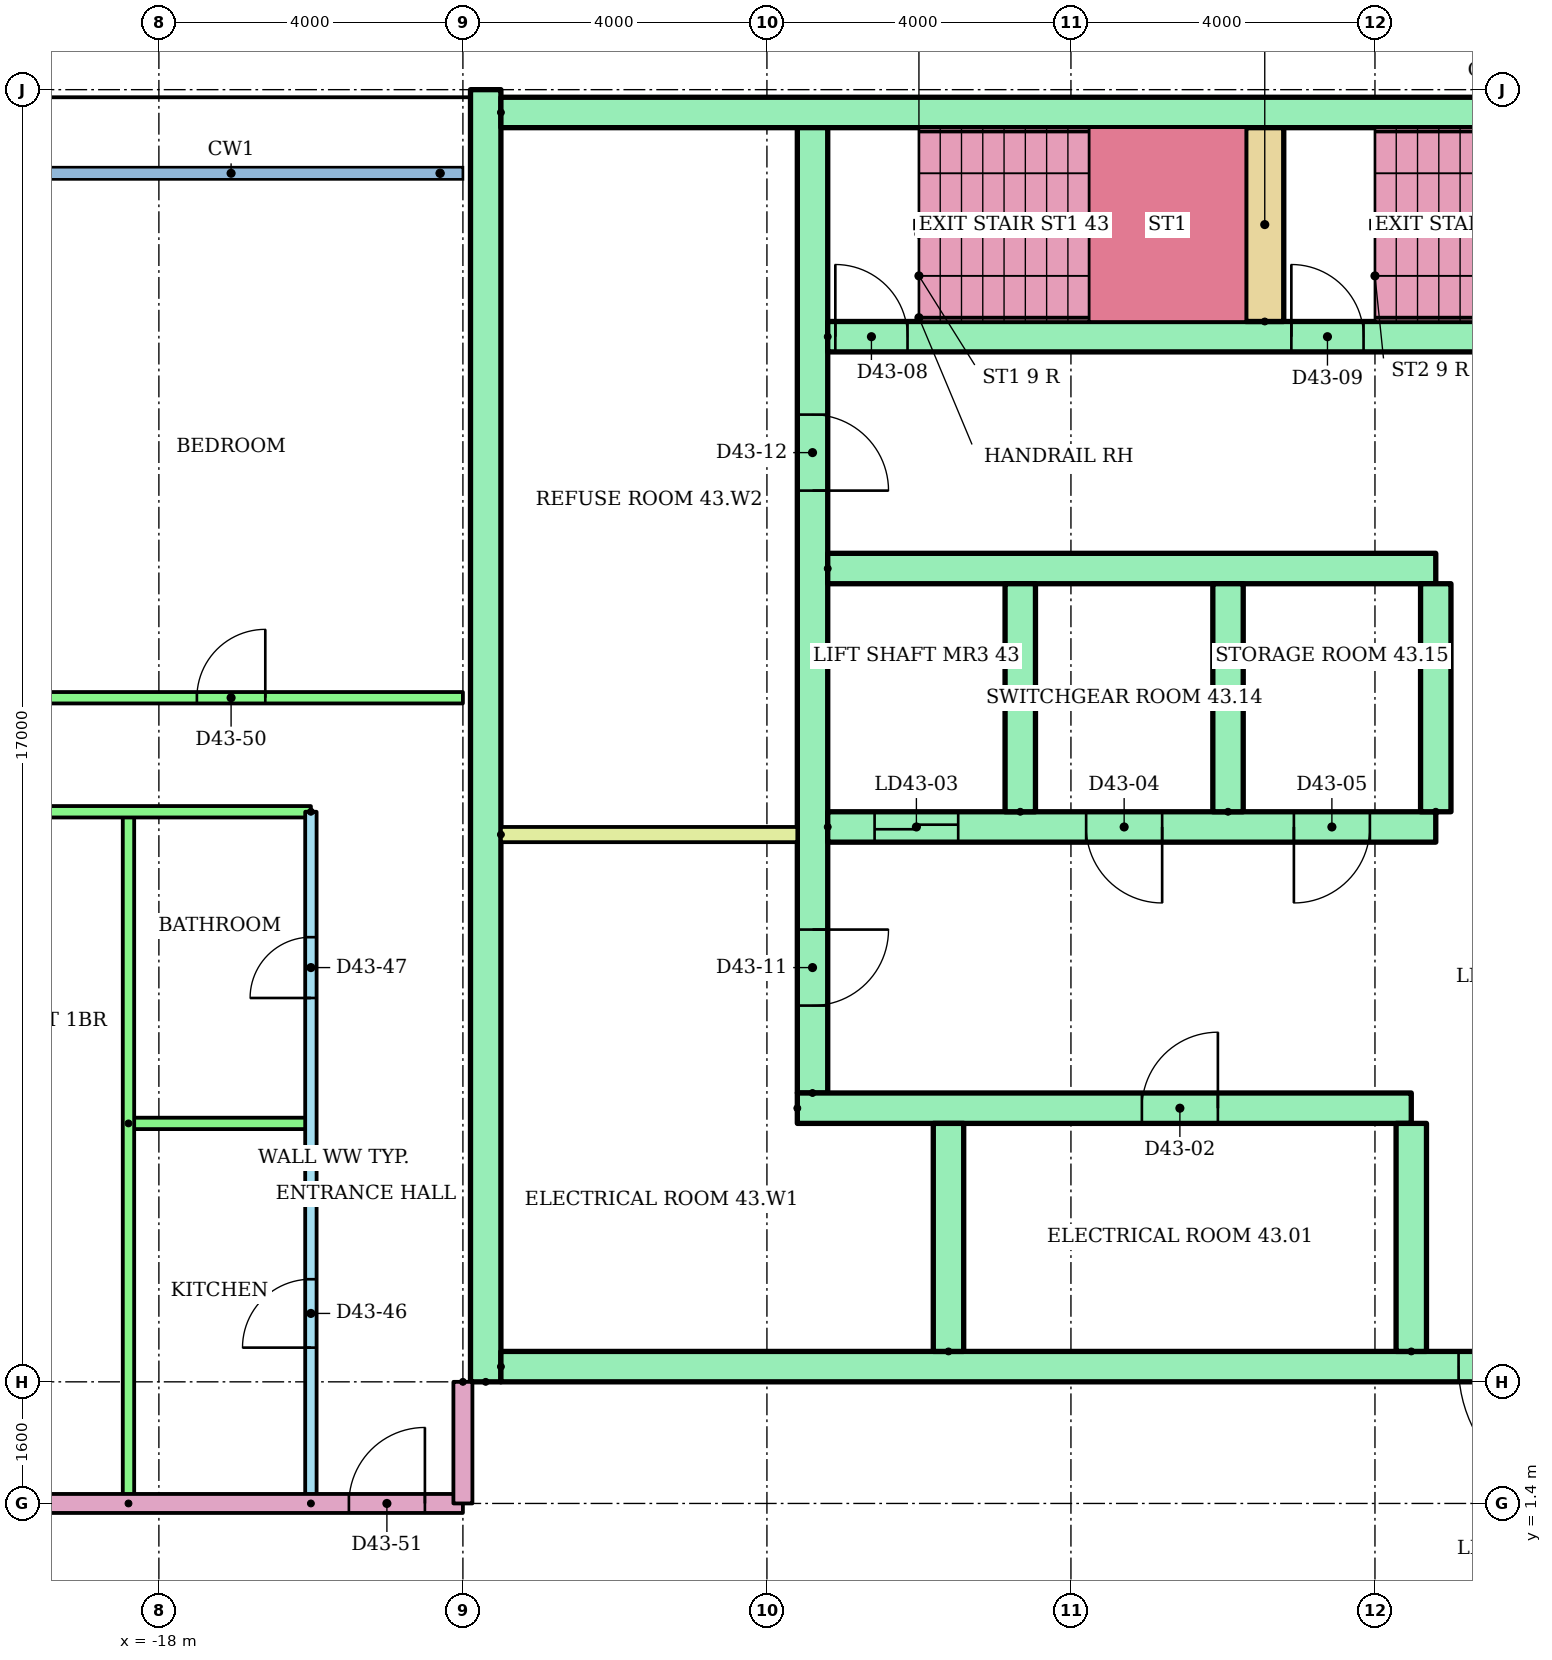
"""IFC4 building model, lengths in metres.
Left out: names, types, materials, properties, quantities, classifications, styles, units other than length and angle.
Written with IfcOpenShell. Run it as: python <this file> out.ifc"""

import sys

from ifc_helpers import new_model, si_unit, direction, frame, frame_2d, origin, place, context, subcontext, project, spatial, rectangle, extrude, element, fill, save


model = new_model("IFC4")
c1 = context("Model", 3, precision=1e-05, world=origin(), true_north=direction((0.0, 1.0)))
c2 = subcontext(c1, "Body", "Model", "MODEL_VIEW")
j1 = project(units=[si_unit("LENGTHUNIT", "METRE"), si_unit("PLANEANGLEUNIT", "RADIAN")], contexts=[c1])
p1 = place(None, origin())
s1 = spatial("IfcSite", under=j1, at=p1, CompositionType="ELEMENT")
p2 = place(p1, origin())
s2 = spatial("IfcBuilding", under=s1, at=p2, CompositionType="ELEMENT")
p3 = place(p2, frame((0.0, 0.0, 168.5)))
s3 = spatial("IfcBuildingStorey", under=s2, at=p3, CompositionType="ELEMENT", Elevation=168.5)
p4 = place(p3, frame((-13.7, 3.0, 0.0), z_axis=(0.0, 0.0, 1.0), x_axis=(0.0, 1.0, 0.0)))
e1 = element("IfcWall", 1, at=p4, inside=s3, PredefinedType="SHEAR", context=c2, shape_type="SweptSolid", body=[
    extrude(rectangle(XDim=17.0, YDim=0.4, at=frame_2d((8.5, 0.0))), origin(), (0.0, 0.0, 1.0), 2.92),
])
p5 = place(p3, frame((-13.5, 19.7, 0.0)))
e2 = element("IfcWall", 2, at=p5, inside=s3, PredefinedType="SHEAR", context=c2, shape_type="SweptSolid", body=[
    extrude(rectangle(XDim=27.0, YDim=0.4, at=frame_2d((13.5, 0.0))), origin(), (0.0, 0.0, 1.0), 2.92),
])
p6 = place(p3, frame((-9.4, 6.8, 0.0), z_axis=(0.0, 0.0, 1.0), x_axis=(0.0, 1.0, 0.0)))
e3 = element("IfcWall", 3, at=p6, inside=s3, PredefinedType="SHEAR", context=c2, shape_type="SweptSolid", body=[
    extrude(rectangle(XDim=12.7, YDim=0.4, at=frame_2d((6.35, 0.0))), origin(), (0.0, 0.0, 1.0), 2.92),
])
p7 = place(p6, frame((1.15, 0.0, 0.0)))
e4 = element("IfcOpeningElement", 4, at=p7, cuts=e3, PredefinedType="OPENING", context=c2, shape_type="SweptSolid", body=[
    extrude(rectangle(XDim=1.0, YDim=2.1, at=frame_2d((0.5, 1.05))), frame((0.0, 0.21, 0.0), z_axis=(0.0, -1.0, 0.0), x_axis=(1.0, 0.0, 0.0)), (0.0, 0.0, 1.0), 0.42),
])
p8 = place(p6, frame((7.925, 0.0, 0.0)))
e5 = element("IfcOpeningElement", 5, at=p8, cuts=e3, PredefinedType="OPENING", context=c2, shape_type="SweptSolid", body=[
    extrude(rectangle(XDim=1.0, YDim=2.1, at=frame_2d((0.5, 1.05))), frame((0.0, 0.21, 0.0), z_axis=(0.0, -1.0, 0.0), x_axis=(1.0, 0.0, 0.0)), (0.0, 0.0, 1.0), 0.42),
])
p9 = place(p3, frame((-13.5, 3.2, 0.0)))
e6 = element("IfcWall", 6, at=p9, inside=s3, PredefinedType="SHEAR", context=c2, shape_type="SweptSolid", body=[
    extrude(rectangle(XDim=27.0, YDim=0.4, at=frame_2d((13.5, 0.0))), origin(), (0.0, 0.0, 1.0), 2.92),
])
p10 = place(p9, frame((22.083, 0.0, 0.0)))
e7 = element("IfcOpeningElement", 7, at=p10, cuts=e6, PredefinedType="OPENING", context=c2, shape_type="SweptSolid", body=[
    extrude(rectangle(XDim=1.1, YDim=2.1, at=frame_2d((0.55, 1.05))), frame((0.0, 0.21, 0.0), z_axis=(0.0, -1.0, 0.0), x_axis=(1.0, 0.0, 0.0)), (0.0, 0.0, 1.0), 0.42),
])
p11 = place(p9, frame((25.128, 0.0, 0.0)))
e8 = element("IfcOpeningElement", 8, at=p11, cuts=e6, PredefinedType="OPENING", context=c2, shape_type="SweptSolid", body=[
    extrude(rectangle(XDim=1.1, YDim=2.1, at=frame_2d((0.55, 1.05))), frame((0.0, 0.21, 0.0), z_axis=(0.0, -1.0, 0.0), x_axis=(1.0, 0.0, 0.0)), (0.0, 0.0, 1.0), 0.42),
])
p12 = place(p9, frame((12.6, 0.0, 0.0)))
e9 = element("IfcOpeningElement", 9, at=p12, cuts=e6, PredefinedType="OPENING", context=c2, shape_type="SweptSolid", body=[
    extrude(rectangle(XDim=1.8, YDim=2.1, at=frame_2d((0.9, 1.05))), frame((0.0, 0.21, 0.0), z_axis=(0.0, -1.0, 0.0), x_axis=(1.0, 0.0, 0.0)), (0.0, 0.0, 1.0), 0.42),
])
p13 = place(p3, frame((-9.6, 6.6, 0.0)))
e10 = element("IfcWall", 10, at=p13, inside=s3, PredefinedType="SHEAR", context=c2, shape_type="SweptSolid", body=[
    extrude(rectangle(XDim=8.078, YDim=0.4, at=frame_2d((4.039, 0.0))), origin(), (0.0, 0.0, 1.0), 2.92),
])
p14 = place(p13, frame((4.533, 0.0, 0.0)))
e11 = element("IfcOpeningElement", 11, at=p14, cuts=e10, PredefinedType="OPENING", context=c2, shape_type="SweptSolid", body=[
    extrude(rectangle(XDim=1.0, YDim=2.1, at=frame_2d((0.5, 1.05))), frame((0.0, 0.21, 0.0), z_axis=(0.0, -1.0, 0.0), x_axis=(1.0, 0.0, 0.0)), (0.0, 0.0, 1.0), 0.42),
])
for number, where, z_axis, x_axis in (
    (12, (-7.611, 3.4, 0.0), (0.0, 0.0, 1.0), (0.0, 1.0, 0.0)),
    (13, (-1.522, 3.4, 0.0), (0.0, 0.0, 1.0), (0.0, 1.0, 0.0)),
):
    element("IfcWall", number, at=place(p3, frame(where, z_axis=z_axis, x_axis=x_axis)), inside=s3, PredefinedType="SHEAR", context=c2, shape_type="SweptSolid", body=[
        extrude(rectangle(XDim=3.0, YDim=0.4, at=frame_2d((1.5, 0.0))), origin(), (0.0, 0.0, 1.0), 2.92),
    ])
p15 = place(p3, frame((-9.2, 10.3, 0.0)))
e14 = element("IfcWall", 14, at=p15, inside=s3, PredefinedType="SHEAR", context=c2, shape_type="SweptSolid", body=[
    extrude(rectangle(XDim=8.0, YDim=0.4, at=frame_2d((4.0, 0.0))), origin(), (0.0, 0.0, 1.0), 2.92),
])
p16 = place(p15, frame((0.617, 0.0, 0.0)))
e15 = element("IfcOpeningElement", 15, at=p16, cuts=e14, PredefinedType="OPENING", context=c2, shape_type="SweptSolid", body=[
    extrude(rectangle(XDim=1.1, YDim=2.1, at=frame_2d((0.55, 1.05))), frame((0.0, 0.21, 0.0), z_axis=(0.0, -1.0, 0.0), x_axis=(1.0, 0.0, 0.0)), (0.0, 0.0, 1.0), 0.42),
])
p17 = place(p15, frame((3.4, 0.0, 0.0)))
e16 = element("IfcOpeningElement", 16, at=p17, cuts=e14, PredefinedType="OPENING", context=c2, shape_type="SweptSolid", body=[
    extrude(rectangle(XDim=1.0, YDim=2.1, at=frame_2d((0.5, 1.05))), frame((0.0, 0.21, 0.0), z_axis=(0.0, -1.0, 0.0), x_axis=(1.0, 0.0, 0.0)), (0.0, 0.0, 1.0), 0.42),
])
p18 = place(p15, frame((6.133, 0.0, 0.0)))
e17 = element("IfcOpeningElement", 17, at=p18, cuts=e14, PredefinedType="OPENING", context=c2, shape_type="SweptSolid", body=[
    extrude(rectangle(XDim=1.0, YDim=2.1, at=frame_2d((0.5, 1.05))), frame((0.0, 0.21, 0.0), z_axis=(0.0, -1.0, 0.0), x_axis=(1.0, 0.0, 0.0)), (0.0, 0.0, 1.0), 0.42),
])
p19 = place(p3, frame((-9.2, 13.7, 0.0)))
e18 = element("IfcWall", 18, at=p19, inside=s3, PredefinedType="SHEAR", context=c2, shape_type="SweptSolid", body=[
    extrude(rectangle(XDim=8.0, YDim=0.4, at=frame_2d((4.0, 0.0))), origin(), (0.0, 0.0, 1.0), 2.92),
])
for number, where, z_axis, x_axis in (
    (19, (-6.667, 10.5, 0.0), (0.0, 0.0, 1.0), (0.0, 1.0, 0.0)),
    (20, (-3.933, 10.5, 0.0), (0.0, 0.0, 1.0), (0.0, 1.0, 0.0)),
    (21, (-1.2, 10.5, 0.0), (0.0, 0.0, 1.0), (0.0, 1.0, 0.0)),
):
    element("IfcWall", number, at=place(p3, frame(where, z_axis=z_axis, x_axis=x_axis)), inside=s3, PredefinedType="SHEAR", context=c2, shape_type="SweptSolid", body=[
        extrude(rectangle(XDim=3.0, YDim=0.4, at=frame_2d((1.5, 0.0))), origin(), (0.0, 0.0, 1.0), 2.92),
    ])
p20 = place(p3, frame((-9.2, 16.75, 0.0)))
e22 = element("IfcWall", 22, at=p20, inside=s3, PredefinedType="SHEAR", context=c2, shape_type="SweptSolid", body=[
    extrude(rectangle(XDim=18.4, YDim=0.4, at=frame_2d((9.2, 0.0))), origin(), (0.0, 0.0, 1.0), 2.92),
])
p21 = place(p20, frame((0.1, 0.0, 0.0)))
e23 = element("IfcOpeningElement", 23, at=p21, cuts=e22, PredefinedType="OPENING", context=c2, shape_type="SweptSolid", body=[
    extrude(rectangle(XDim=0.95, YDim=2.1, at=frame_2d((0.475, 1.05))), frame((0.0, 0.21, 0.0), z_axis=(0.0, -1.0, 0.0), x_axis=(1.0, 0.0, 0.0)), (0.0, 0.0, 1.0), 0.42),
])
p22 = place(p20, frame((6.1, 0.0, 0.0)))
e24 = element("IfcOpeningElement", 24, at=p22, cuts=e22, PredefinedType="OPENING", context=c2, shape_type="SweptSolid", body=[
    extrude(rectangle(XDim=0.95, YDim=2.1, at=frame_2d((0.475, 1.05))), frame((0.0, 0.21, 0.0), z_axis=(0.0, -1.0, 0.0), x_axis=(1.0, 0.0, 0.0)), (0.0, 0.0, 1.0), 0.42),
])
p23 = place(p20, frame((12.1, 0.0, 0.0)))
e25 = element("IfcOpeningElement", 25, at=p23, cuts=e22, PredefinedType="OPENING", context=c2, shape_type="SweptSolid", body=[
    extrude(rectangle(XDim=0.95, YDim=2.1, at=frame_2d((0.475, 1.05))), frame((0.0, 0.21, 0.0), z_axis=(0.0, -1.0, 0.0), x_axis=(1.0, 0.0, 0.0)), (0.0, 0.0, 1.0), 0.42),
])
p24 = place(p3, frame((-3.45, 16.95, 0.0), z_axis=(0.0, 0.0, 1.0), x_axis=(0.0, 1.0, 0.0)))
e26 = element("IfcWall", 26, at=p24, inside=s3, PredefinedType="SHEAR", context=c2, shape_type="SweptSolid", body=[
    extrude(rectangle(XDim=2.55, YDim=0.5, at=frame_2d((1.275, 0.0))), origin(), (0.0, 0.0, 1.0), 2.92),
])
p25 = place(p3, frame((-13.5, 10.2, 0.0)))
e27 = element("IfcWall", 27, at=p25, inside=s3, PredefinedType="PARTITIONING", context=c2, shape_type="SweptSolid", body=[
    extrude(rectangle(XDim=3.9, YDim=0.2, at=frame_2d((1.95, 0.0))), origin(), (0.0, 0.0, 1.0), 2.92),
])
p26 = place(p3, frame((-16.0, 1.4, 0.0), z_axis=(0.0, 0.0, 1.0), x_axis=(0.0, 1.0, 0.0)))
e28 = element("IfcWall", 28, at=p26, inside=s3, PredefinedType="PARTITIONING", context=c2, shape_type="SweptSolid", body=[
    extrude(rectangle(XDim=9.1, YDim=0.15, at=frame_2d((4.55, 0.0))), origin(), (0.0, 0.0, 1.0), 2.4),
])
p27 = place(p26, frame((2.05, 0.0, 0.0)))
e29 = element("IfcOpeningElement", 29, at=p27, cuts=e28, PredefinedType="OPENING", context=c2, shape_type="SweptSolid", body=[
    extrude(rectangle(XDim=0.9, YDim=2.1, at=frame_2d((0.45, 1.05))), frame((0.0, 0.085, 0.0), z_axis=(0.0, -1.0, 0.0), x_axis=(1.0, 0.0, 0.0)), (0.0, 0.0, 1.0), 0.17),
])
p28 = place(p26, frame((6.65, 0.0, 0.0)))
e30 = element("IfcOpeningElement", 30, at=p28, cuts=e28, PredefinedType="OPENING", context=c2, shape_type="SweptSolid", body=[
    extrude(rectangle(XDim=0.8, YDim=2.1, at=frame_2d((0.4, 1.05))), frame((0.0, 0.085, 0.0), z_axis=(0.0, -1.0, 0.0), x_axis=(1.0, 0.0, 0.0)), (0.0, 0.0, 1.0), 0.17),
])
p29 = place(p3, frame((-18.4, 6.4, 0.0)))
e31 = element("IfcWall", 31, at=p29, inside=s3, PredefinedType="PARTITIONING", context=c2, shape_type="SweptSolid", body=[
    extrude(rectangle(XDim=2.4, YDim=0.15, at=frame_2d((1.2, 0.0))), origin(), (0.0, 0.0, 1.0), 2.4),
])
p30 = place(p3, frame((-18.4, 1.4, 0.0), z_axis=(0.0, 0.0, 1.0), x_axis=(0.0, 1.0, 0.0)))
e32 = element("IfcWall", 32, at=p30, inside=s3, PredefinedType="PARTITIONING", context=c2, shape_type="SweptSolid", body=[
    extrude(rectangle(XDim=9.1, YDim=0.15, at=frame_2d((4.55, 0.0))), origin(), (0.0, 0.0, 1.0), 2.4),
])
p31 = place(p3, frame((-16.0, 10.5, 0.0), z_axis=(0.0, 0.0, 1.0), x_axis=(-1.0, 0.0, 0.0)))
e33 = element("IfcWall", 33, at=p31, inside=s3, PredefinedType="PARTITIONING", context=c2, shape_type="SweptSolid", body=[
    extrude(rectangle(XDim=8.82, YDim=0.15, at=frame_2d((4.41, 0.0))), origin(), (0.0, 0.0, 1.0), 2.4),
])
p32 = place(p31, frame((4.553, 0.0, 0.0)))
e34 = element("IfcOpeningElement", 34, at=p32, cuts=e33, PredefinedType="OPENING", context=c2, shape_type="SweptSolid", body=[
    extrude(rectangle(XDim=0.9, YDim=2.1, at=frame_2d((0.45, 1.05))), frame((0.0, 0.085, 0.0), z_axis=(0.0, -1.0, 0.0), x_axis=(1.0, 0.0, 0.0)), (0.0, 0.0, 1.0), 0.17),
])
p33 = place(p3, frame((-24.82, 12.0, 0.0)))
e35 = element("IfcWall", 35, at=p33, inside=s3, PredefinedType="PARTITIONING", context=c2, shape_type="SweptSolid", body=[
    extrude(rectangle(XDim=10.82, YDim=0.15, at=frame_2d((5.41, 0.0))), origin(), (0.0, 0.0, 1.0), 2.4),
])
p34 = place(p33, frame((1.273, 0.0, 0.0)))
e36 = element("IfcOpeningElement", 36, at=p34, cuts=e35, PredefinedType="OPENING", context=c2, shape_type="SweptSolid", body=[
    extrude(rectangle(XDim=1.0, YDim=2.1, at=frame_2d((0.5, 1.05))), frame((0.0, 0.085, 0.0), z_axis=(0.0, -1.0, 0.0), x_axis=(1.0, 0.0, 0.0)), (0.0, 0.0, 1.0), 0.17),
])
p35 = place(p33, frame((7.32, 0.0, 0.0)))
e37 = element("IfcOpeningElement", 37, at=p35, cuts=e35, PredefinedType="OPENING", context=c2, shape_type="SweptSolid", body=[
    extrude(rectangle(XDim=0.9, YDim=2.1, at=frame_2d((0.45, 1.05))), frame((0.0, 0.085, 0.0), z_axis=(0.0, -1.0, 0.0), x_axis=(1.0, 0.0, 0.0)), (0.0, 0.0, 1.0), 0.17),
])
p36 = place(p3, frame((-24.82, 1.4, 0.0)))
e38 = element("IfcWall", 38, at=p36, inside=s3, PredefinedType="PARTITIONING", context=c2, shape_type="SweptSolid", body=[
    extrude(rectangle(XDim=10.82, YDim=0.25, at=frame_2d((5.41, 0.0))), origin(), (0.0, 0.0, 1.0), 2.4),
])
p37 = place(p36, frame((9.32, 0.0, 0.0)))
e39 = element("IfcOpeningElement", 39, at=p37, cuts=e38, PredefinedType="OPENING", context=c2, shape_type="SweptSolid", body=[
    extrude(rectangle(XDim=1.0, YDim=2.1, at=frame_2d((0.5, 1.05))), frame((0.0, 0.135, 0.0), z_axis=(0.0, -1.0, 0.0), x_axis=(1.0, 0.0, 0.0)), (0.0, 0.0, 1.0), 0.27),
])
p38 = place(p3, frame((-14.0, 3.0, 0.0), z_axis=(0.0, 0.0, 1.0), x_axis=(0.0, -1.0, 0.0)))
e40 = element("IfcWall", 40, at=p38, inside=s3, PredefinedType="PARTITIONING", context=c2, shape_type="SweptSolid", body=[
    extrude(rectangle(XDim=1.6, YDim=0.25, at=frame_2d((0.8, 0.0))), origin(), (0.0, 0.0, 1.0), 2.4),
])
p39 = place(p12, frame((1.8, 0.0, 0.0), z_axis=(0.0, 0.0, 1.0), x_axis=(-1.0, 0.0, 0.0)))
e41 = element("IfcDoor", 41, at=p39, inside=s3, OperationType="DOUBLE_DOOR_SINGLE_SWING", PredefinedType="DOOR", context=c2, shape_type="SweptSolid", body=[
    extrude(rectangle(XDim=1.8, YDim=2.1, at=frame_2d((0.9, 1.05))), frame((0.0, 0.025, 0.0), z_axis=(0.0, -1.0, 0.0), x_axis=(1.0, 0.0, 0.0)), (0.0, 0.0, 1.0), 0.05),
])
fill(e9, e41)
p40 = place(p14, origin())
e42 = element("IfcDoor", 42, at=p40, inside=s3, OperationType="SINGLE_SWING_RIGHT", PredefinedType="DOOR", context=c2, shape_type="SweptSolid", body=[
    extrude(rectangle(XDim=1.0, YDim=2.1, at=frame_2d((0.5, 1.05))), frame((0.0, 0.025, 0.0), z_axis=(0.0, -1.0, 0.0), x_axis=(1.0, 0.0, 0.0)), (0.0, 0.0, 1.0), 0.05),
])
fill(e11, e42)
p41 = place(p16, origin())
e43 = element("IfcDoor", 43, at=p41, inside=s3, OperationType="SLIDING_TO_LEFT", PredefinedType="DOOR", context=c2, shape_type="SweptSolid", body=[
    extrude(rectangle(XDim=1.1, YDim=2.1, at=frame_2d((0.55, 1.05))), frame((0.0, 0.025, 0.0), z_axis=(0.0, -1.0, 0.0), x_axis=(1.0, 0.0, 0.0)), (0.0, 0.0, 1.0), 0.05),
])
fill(e15, e43)
p42 = place(p17, frame((1.0, 0.0, 0.0), z_axis=(0.0, 0.0, 1.0), x_axis=(-1.0, 0.0, 0.0)))
e44 = element("IfcDoor", 44, at=p42, inside=s3, OperationType="SINGLE_SWING_RIGHT", PredefinedType="DOOR", context=c2, shape_type="SweptSolid", body=[
    extrude(rectangle(XDim=1.0, YDim=2.1, at=frame_2d((0.5, 1.05))), frame((0.0, 0.025, 0.0), z_axis=(0.0, -1.0, 0.0), x_axis=(1.0, 0.0, 0.0)), (0.0, 0.0, 1.0), 0.05),
])
fill(e16, e44)
p43 = place(p18, frame((1.0, 0.0, 0.0), z_axis=(0.0, 0.0, 1.0), x_axis=(-1.0, 0.0, 0.0)))
e45 = element("IfcDoor", 45, at=p43, inside=s3, OperationType="SINGLE_SWING_LEFT", PredefinedType="DOOR", context=c2, shape_type="SweptSolid", body=[
    extrude(rectangle(XDim=1.0, YDim=2.1, at=frame_2d((0.5, 1.05))), frame((0.0, 0.025, 0.0), z_axis=(0.0, -1.0, 0.0), x_axis=(1.0, 0.0, 0.0)), (0.0, 0.0, 1.0), 0.05),
])
fill(e17, e45)
p44 = place(p21, origin())
e46 = element("IfcDoor", 46, at=p44, inside=s3, OperationType="SINGLE_SWING_LEFT", PredefinedType="DOOR", context=c2, shape_type="SweptSolid", body=[
    extrude(rectangle(XDim=0.95, YDim=2.1, at=frame_2d((0.475, 1.05))), frame((0.0, 0.025, 0.0), z_axis=(0.0, -1.0, 0.0), x_axis=(1.0, 0.0, 0.0)), (0.0, 0.0, 1.0), 0.05),
])
fill(e23, e46)
p45 = place(p22, origin())
e47 = element("IfcDoor", 47, at=p45, inside=s3, OperationType="SINGLE_SWING_LEFT", PredefinedType="DOOR", context=c2, shape_type="SweptSolid", body=[
    extrude(rectangle(XDim=0.95, YDim=2.1, at=frame_2d((0.475, 1.05))), frame((0.0, 0.025, 0.0), z_axis=(0.0, -1.0, 0.0), x_axis=(1.0, 0.0, 0.0)), (0.0, 0.0, 1.0), 0.05),
])
fill(e24, e47)
p46 = place(p7, frame((1.0, 0.0, 0.0), z_axis=(0.0, 0.0, 1.0), x_axis=(-1.0, 0.0, 0.0)))
e48 = element("IfcDoor", 48, at=p46, inside=s3, OperationType="SINGLE_SWING_RIGHT", PredefinedType="DOOR", context=c2, shape_type="SweptSolid", body=[
    extrude(rectangle(XDim=1.0, YDim=2.1, at=frame_2d((0.5, 1.05))), frame((0.0, 0.025, 0.0), z_axis=(0.0, -1.0, 0.0), x_axis=(1.0, 0.0, 0.0)), (0.0, 0.0, 1.0), 0.05),
])
fill(e4, e48)
p47 = place(p8, frame((1.0, 0.0, 0.0), z_axis=(0.0, 0.0, 1.0), x_axis=(-1.0, 0.0, 0.0)))
e49 = element("IfcDoor", 49, at=p47, inside=s3, OperationType="SINGLE_SWING_LEFT", PredefinedType="DOOR", context=c2, shape_type="SweptSolid", body=[
    extrude(rectangle(XDim=1.0, YDim=2.1, at=frame_2d((0.5, 1.05))), frame((0.0, 0.025, 0.0), z_axis=(0.0, -1.0, 0.0), x_axis=(1.0, 0.0, 0.0)), (0.0, 0.0, 1.0), 0.05),
])
fill(e5, e49)
p48 = place(p27, origin())
e50 = element("IfcDoor", 50, at=p48, inside=s3, OperationType="SINGLE_SWING_LEFT", PredefinedType="DOOR", context=c2, shape_type="SweptSolid", body=[
    extrude(rectangle(XDim=0.9, YDim=2.1, at=frame_2d((0.45, 1.05))), frame((0.0, 0.025, 0.0), z_axis=(0.0, -1.0, 0.0), x_axis=(1.0, 0.0, 0.0)), (0.0, 0.0, 1.0), 0.05),
])
fill(e29, e50)
p49 = place(p28, origin())
e51 = element("IfcDoor", 51, at=p49, inside=s3, OperationType="SINGLE_SWING_LEFT", PredefinedType="DOOR", context=c2, shape_type="SweptSolid", body=[
    extrude(rectangle(XDim=0.8, YDim=2.1, at=frame_2d((0.4, 1.05))), frame((0.0, 0.025, 0.0), z_axis=(0.0, -1.0, 0.0), x_axis=(1.0, 0.0, 0.0)), (0.0, 0.0, 1.0), 0.05),
])
fill(e30, e51)
p50 = place(p35, origin())
e52 = element("IfcDoor", 52, at=p50, inside=s3, OperationType="SINGLE_SWING_RIGHT", PredefinedType="DOOR", context=c2, shape_type="SweptSolid", body=[
    extrude(rectangle(XDim=0.9, YDim=2.1, at=frame_2d((0.45, 1.05))), frame((0.0, 0.025, 0.0), z_axis=(0.0, -1.0, 0.0), x_axis=(1.0, 0.0, 0.0)), (0.0, 0.0, 1.0), 0.05),
])
fill(e37, e52)
p51 = place(p37, origin())
e53 = element("IfcDoor", 53, at=p51, inside=s3, OperationType="SINGLE_SWING_RIGHT", PredefinedType="DOOR", context=c2, shape_type="SweptSolid", body=[
    extrude(rectangle(XDim=1.0, YDim=2.1, at=frame_2d((0.5, 1.05))), frame((0.0, 0.025, 0.0), z_axis=(0.0, -1.0, 0.0), x_axis=(1.0, 0.0, 0.0)), (0.0, 0.0, 1.0), 0.05),
])
fill(e39, e53)
save(model, sys.argv[1])
